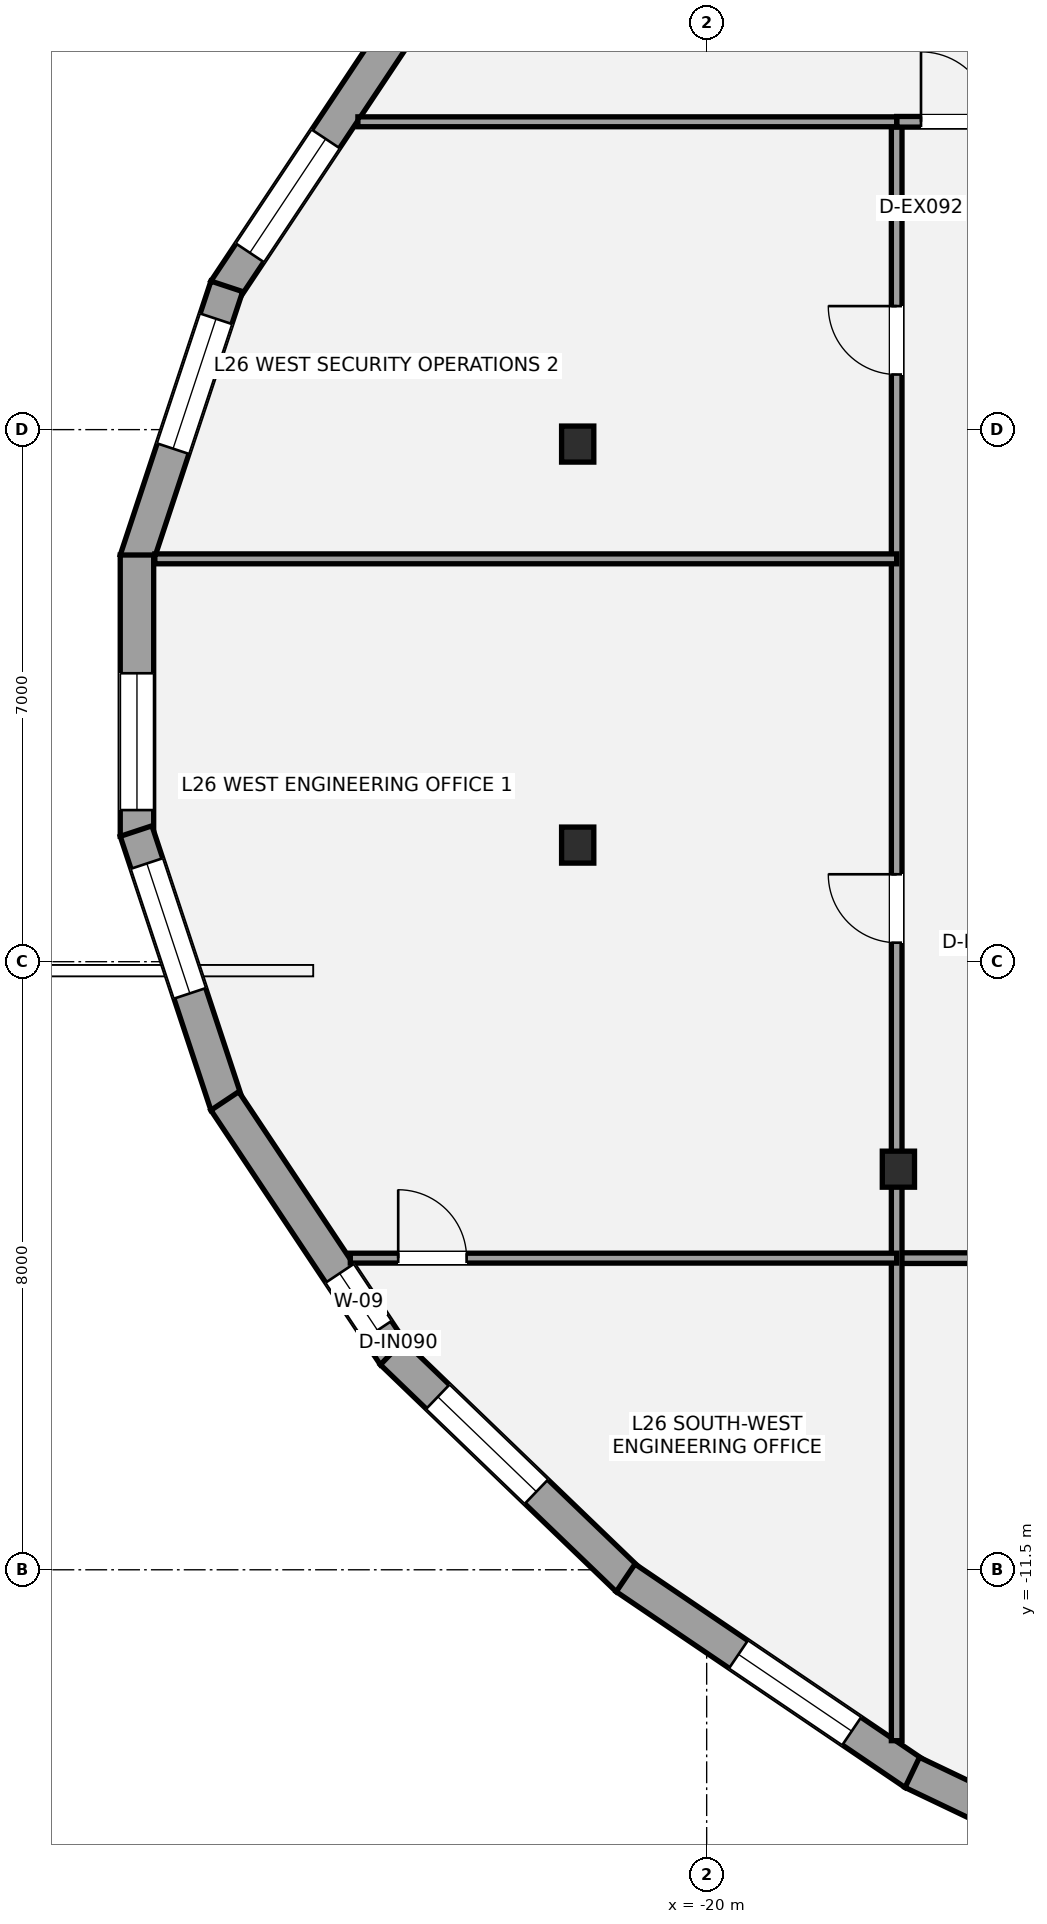
"""IFC4 building model, lengths in metres.
Left out: names, types, materials, properties, quantities, classifications, styles, units other than length and angle.
Written with IfcOpenShell. Run it as: python <this file> out.ifc"""

import sys

from ifc_helpers import new_model, si_unit, direction, frame, frame_2d, origin, origin_2d, place, context, subcontext, project, spatial, rectangle, i_section, extrude, element, fill, save


model = new_model("IFC4")
c1 = context("Model", 3, precision=1e-05, world=origin(), true_north=direction((0.0, 1.0)))
c2 = subcontext(c1, "Body", "Model", "MODEL_VIEW")
j1 = project(units=[si_unit("LENGTHUNIT", "METRE"), si_unit("PLANEANGLEUNIT", "RADIAN")], contexts=[c1])
p1 = place(None, origin())
s1 = spatial("IfcSite", under=j1, at=p1, CompositionType="ELEMENT")
p2 = place(p1, origin())
s2 = spatial("IfcBuilding", under=s1, at=p2, CompositionType="ELEMENT")
p3 = place(p2, frame((0.0, 0.0, 100.1)))
s3 = spatial("IfcBuildingStorey", under=s2, at=p3, CompositionType="ELEMENT", Elevation=100.1)
for number, where, z_axis, x_axis in (
    (1, (-21.697, 3.31, 0.0), (0.0, 0.0, 1.0), (1.0, 0.0, 0.0)),
    (2, (-21.697, -1.966, 0.0), (0.0, 0.0, 1.0), (1.0, 0.0, 0.0)),
    (3, (-17.477, -6.229, 0.0), (0.0, 0.0, 1.0), (1.0, 0.0, 0.0)),
):
    element("IfcColumn", number, at=place(p3, frame(where, z_axis=z_axis, x_axis=x_axis)), inside=s3, PredefinedType="COLUMN", context=c2, shape_type="SweptSolid", body=[
        extrude(i_section(OverallWidth=0.424, OverallDepth=0.474, WebThickness=0.048, FlangeThickness=0.077, at=origin_2d()), origin(), (0.0, 0.0, 1.0), 3.5),
    ])
p4 = place(p3, frame((-26.34, 5.332, 0.0), z_axis=(0.0, 0.0, 1.0), x_axis=(0.554293965046, 0.83232097193, 0.0)))
e4 = element("IfcWall", 4, at=p4, inside=s3, PredefinedType="STANDARD", context=c2, shape_type="SweptSolid", body=[
    extrude(rectangle(XDim=4.023, YDim=0.44, at=frame_2d((2.011, 0.0))), origin(), (0.0, 0.0, 1.0), 2.528),
])
p5 = place(p4, frame((0.594, 0.0, 0.65)))
e5 = element("IfcOpeningElement", 5, at=p5, cuts=e4, PredefinedType="OPENING", context=c2, shape_type="SweptSolid", body=[
    extrude(rectangle(XDim=1.8, YDim=1.7, at=frame_2d((0.9, 0.85))), frame((0.0, 0.23, 0.0), z_axis=(0.0, -1.0, 0.0), x_axis=(1.0, 0.0, 0.0)), (0.0, 0.0, 1.0), 0.46),
])
p6 = place(p3, frame((-27.507, 1.781, 0.0), z_axis=(0.0, 0.0, 1.0), x_axis=(0.314316911692, 0.94931811266, 0.0)))
e6 = element("IfcWall", 6, at=p6, inside=s3, PredefinedType="STANDARD", context=c2, shape_type="SweptSolid", body=[
    extrude(rectangle(XDim=3.796, YDim=0.44, at=frame_2d((1.898, 0.0))), origin(), (0.0, 0.0, 1.0), 2.528),
])
p7 = place(p6, frame((1.547, 0.0, 0.65)))
e7 = element("IfcOpeningElement", 7, at=p7, cuts=e6, PredefinedType="OPENING", context=c2, shape_type="SweptSolid", body=[
    extrude(rectangle(XDim=1.8, YDim=1.7, at=frame_2d((0.9, 0.85))), frame((0.0, 0.23, 0.0), z_axis=(0.0, -1.0, 0.0), x_axis=(1.0, 0.0, 0.0)), (0.0, 0.0, 1.0), 0.46),
])
p8 = place(p3, frame((-27.496, -1.851, 0.0), z_axis=(0.0, 0.0, 1.0), x_axis=(0.0, 1.0, 0.0)))
e8 = element("IfcWall", 8, at=p8, inside=s3, PredefinedType="STANDARD", context=c2, shape_type="SweptSolid", body=[
    extrude(rectangle(XDim=3.701, YDim=0.44, at=frame_2d((1.851, 0.0))), origin(), (0.0, 0.0, 1.0), 2.528),
])
p9 = place(p8, frame((0.345, 0.0, 0.65)))
e9 = element("IfcOpeningElement", 9, at=p9, cuts=e8, PredefinedType="OPENING", context=c2, shape_type="SweptSolid", body=[
    extrude(rectangle(XDim=1.8, YDim=1.7, at=frame_2d((0.9, 0.85))), frame((0.0, 0.23, 0.0), z_axis=(0.0, -1.0, 0.0), x_axis=(1.0, 0.0, 0.0)), (0.0, 0.0, 1.0), 0.46),
])
p10 = place(p3, frame((-26.314, -5.385, 0.0), z_axis=(0.0, 0.0, 1.0), x_axis=(-0.314316911692, 0.94931811266, 0.0)))
e10 = element("IfcWall", 10, at=p10, inside=s3, PredefinedType="STANDARD", context=c2, shape_type="SweptSolid", body=[
    extrude(rectangle(XDim=3.796, YDim=0.44, at=frame_2d((1.898, 0.0))), origin(), (0.0, 0.0, 1.0), 2.528),
])
p11 = place(p10, frame((1.547, 0.0, 0.65)))
e11 = element("IfcOpeningElement", 11, at=p11, cuts=e10, PredefinedType="OPENING", context=c2, shape_type="SweptSolid", body=[
    extrude(rectangle(XDim=1.8, YDim=1.7, at=frame_2d((0.9, 0.85))), frame((0.0, 0.23, 0.0), z_axis=(0.0, -1.0, 0.0), x_axis=(1.0, 0.0, 0.0)), (0.0, 0.0, 1.0), 0.46),
])
p12 = place(p3, frame((-24.11, -8.68, 0.0), z_axis=(0.0, 0.0, 1.0), x_axis=(-0.554293965046, 0.83232097193, 0.0)))
e12 = element("IfcWall", 12, at=p12, inside=s3, PredefinedType="STANDARD", context=c2, shape_type="SweptSolid", body=[
    extrude(rectangle(XDim=4.023, YDim=0.44, at=frame_2d((2.011, 0.0))), origin(), (0.0, 0.0, 1.0), 2.528),
])
p13 = place(p12, frame((0.398, 0.0, 0.58)))
e13 = element("IfcOpeningElement", 13, at=p13, cuts=e12, PredefinedType="OPENING", context=c2, shape_type="SweptSolid", body=[
    extrude(rectangle(XDim=0.9, YDim=1.35, at=frame_2d((0.45, 0.675))), frame((0.0, 0.23, 0.0), z_axis=(0.0, -1.0, 0.0), x_axis=(1.0, 0.0, 0.0)), (0.0, 0.0, 1.0), 0.46),
])
p14 = place(p3, frame((-21.037, -11.63, 0.0), z_axis=(0.0, 0.0, 1.0), x_axis=(-0.720581378362, 0.693370375166, 0.0)))
e14 = element("IfcWall", 14, at=p14, inside=s3, PredefinedType="STANDARD", context=c2, shape_type="SweptSolid", body=[
    extrude(rectangle(XDim=4.307, YDim=0.44, at=frame_2d((2.153, 0.0))), origin(), (0.0, 0.0, 1.0), 2.528),
])
p15 = place(p14, frame((1.67, 0.0, 0.65)))
e15 = element("IfcOpeningElement", 15, at=p15, cuts=e14, PredefinedType="OPENING", context=c2, shape_type="SweptSolid", body=[
    extrude(rectangle(XDim=1.8, YDim=1.7, at=frame_2d((0.9, 0.85))), frame((0.0, 0.23, 0.0), z_axis=(0.0, -1.0, 0.0), x_axis=(1.0, 0.0, 0.0)), (0.0, 0.0, 1.0), 0.46),
])
p16 = place(p3, frame((-17.266, -14.182, 0.0), z_axis=(0.0, 0.0, 1.0), x_axis=(-0.827754551165, 0.56109036975, 0.0)))
e16 = element("IfcWall", 16, at=p16, inside=s3, PredefinedType="STANDARD", context=c2, shape_type="SweptSolid", body=[
    extrude(rectangle(XDim=4.591, YDim=0.44, at=frame_2d((2.295, 0.0))), origin(), (0.0, 0.0, 1.0), 2.528),
])
p17 = place(p16, frame((0.997, 0.0, 0.65)))
e17 = element("IfcOpeningElement", 17, at=p17, cuts=e16, PredefinedType="OPENING", context=c2, shape_type="SweptSolid", body=[
    extrude(rectangle(XDim=1.8, YDim=1.7, at=frame_2d((0.9, 0.85))), frame((0.0, 0.23, 0.0), z_axis=(0.0, -1.0, 0.0), x_axis=(1.0, 0.0, 0.0)), (0.0, 0.0, 1.0), 0.46),
])
p18 = place(p3, frame((-12.89, -16.27, 0.0), z_axis=(0.0, 0.0, 1.0), x_axis=(-0.902372757907, 0.430956385018, 0.0)))
e18 = element("IfcWall", 18, at=p18, inside=s3, PredefinedType="STANDARD", context=c2, shape_type="SweptSolid", body=[
    extrude(rectangle(XDim=4.882, YDim=0.44, at=frame_2d((2.441, 0.0))), origin(), (0.0, 0.0, 1.0), 2.528),
])
p19 = place(p18, frame((1.839, 0.0, 0.65)))
e19 = element("IfcOpeningElement", 19, at=p19, cuts=e18, PredefinedType="OPENING", context=c2, shape_type="SweptSolid", body=[
    extrude(rectangle(XDim=1.8, YDim=1.7, at=frame_2d((0.9, 0.85))), frame((0.0, 0.23, 0.0), z_axis=(0.0, -1.0, 0.0), x_axis=(1.0, 0.0, 0.0)), (0.0, 0.0, 1.0), 0.46),
])
p20 = place(p3, frame((-17.5, -7.4, 0.0), z_axis=(0.0, 0.0, 1.0), x_axis=(1.0, 0.0, 0.0)))
e20 = element("IfcWall", 20, at=p20, inside=s3, PredefinedType="PARTITIONING", context=c2, shape_type="SweptSolid", body=[
    extrude(rectangle(XDim=33.2, YDim=0.14, at=frame_2d((16.6, 0.0))), origin(), (0.0, 0.0, 1.0), 2.688),
])
p21 = place(p20, frame((6.3, 0.0, 0.0)))
e21 = element("IfcOpeningElement", 21, at=p21, cuts=e20, PredefinedType="OPENING", context=c2, shape_type="SweptSolid", body=[
    extrude(rectangle(XDim=0.9, YDim=2.1, at=frame_2d((0.45, 1.05))), frame((0.0, 0.08, 0.0), z_axis=(0.0, -1.0, 0.0), x_axis=(1.0, 0.0, 0.0)), (0.0, 0.0, 1.0), 0.16),
])
p22 = place(p20, frame((18.05, 0.0, 0.0)))
e22 = element("IfcOpeningElement", 22, at=p22, cuts=e20, PredefinedType="OPENING", context=c2, shape_type="SweptSolid", body=[
    extrude(rectangle(XDim=0.9, YDim=2.1, at=frame_2d((0.45, 1.05))), frame((0.0, 0.08, 0.0), z_axis=(0.0, -1.0, 0.0), x_axis=(1.0, 0.0, 0.0)), (0.0, 0.0, 1.0), 0.16),
])
p23 = place(p20, frame((27.9, 0.0, 0.0)))
e23 = element("IfcOpeningElement", 23, at=p23, cuts=e20, PredefinedType="OPENING", context=c2, shape_type="SweptSolid", body=[
    extrude(rectangle(XDim=0.9, YDim=2.1, at=frame_2d((0.45, 1.05))), frame((0.0, 0.08, 0.0), z_axis=(0.0, -1.0, 0.0), x_axis=(1.0, 0.0, 0.0)), (0.0, 0.0, 1.0), 0.16),
])
p24 = place(p3, frame((-17.5, -13.748, 0.0), z_axis=(0.0, 0.0, 1.0), x_axis=(0.0, 1.0, 0.0)))
e24 = element("IfcWall", 24, at=p24, inside=s3, PredefinedType="PARTITIONING", context=c2, shape_type="SweptSolid", body=[
    extrude(rectangle(XDim=21.298, YDim=0.14, at=frame_2d((10.649, 0.0))), origin(), (0.0, 0.0, 1.0), 2.688),
])
p25 = place(p24, frame((10.499, 0.0, 0.0)))
e25 = element("IfcOpeningElement", 25, at=p25, cuts=e24, PredefinedType="OPENING", context=c2, shape_type="SweptSolid", body=[
    extrude(rectangle(XDim=0.9, YDim=2.1, at=frame_2d((0.45, 1.05))), frame((0.0, 0.08, 0.0), z_axis=(0.0, -1.0, 0.0), x_axis=(1.0, 0.0, 0.0)), (0.0, 0.0, 1.0), 0.16),
])
p26 = place(p24, frame((17.974, 0.0, 0.0)))
e26 = element("IfcOpeningElement", 26, at=p26, cuts=e24, PredefinedType="OPENING", context=c2, shape_type="SweptSolid", body=[
    extrude(rectangle(XDim=0.9, YDim=2.1, at=frame_2d((0.45, 1.05))), frame((0.0, 0.08, 0.0), z_axis=(0.0, -1.0, 0.0), x_axis=(1.0, 0.0, 0.0)), (0.0, 0.0, 1.0), 0.16),
])
p27 = place(p3, frame((-17.5, 7.55, 0.0), z_axis=(0.0, 0.0, 1.0), x_axis=(1.0, 0.0, 0.0)))
e27 = element("IfcWall", 27, at=p27, inside=s3, PredefinedType="PARTITIONING", context=c2, shape_type="SweptSolid", body=[
    extrude(rectangle(XDim=3.6, YDim=0.14, at=frame_2d((1.8, 0.0))), origin(), (0.0, 0.0, 1.0), 3.31),
])
p28 = place(p27, frame((0.32, 0.0, 0.0)))
e28 = element("IfcOpeningElement", 28, at=p28, cuts=e27, PredefinedType="OPENING", context=c2, shape_type="SweptSolid", body=[
    extrude(rectangle(XDim=0.92, YDim=2.15, at=frame_2d((0.46, 1.075))), frame((0.0, 0.08, 0.0), z_axis=(0.0, -1.0, 0.0), x_axis=(1.0, 0.0, 0.0)), (0.0, 0.0, 1.0), 0.16),
])
p29 = place(p3, frame((-24.589, 7.55, 0.0), z_axis=(0.0, 0.0, 1.0), x_axis=(1.0, 0.0, 0.0)))
e29 = element("IfcWall", 29, at=p29, inside=s3, PredefinedType="PARTITIONING", context=c2, shape_type="SweptSolid", body=[
    extrude(rectangle(XDim=7.089, YDim=0.13, at=frame_2d((3.544, 0.0))), origin(), (0.0, 0.0, 1.0), 2.763),
])
p30 = place(p3, frame((-24.689, -7.4, 0.0), z_axis=(0.0, 0.0, 1.0), x_axis=(1.0, 0.0, 0.0)))
e30 = element("IfcWall", 30, at=p30, inside=s3, PredefinedType="PARTITIONING", context=c2, shape_type="SweptSolid", body=[
    extrude(rectangle(XDim=7.189, YDim=0.13, at=frame_2d((3.594, 0.0))), origin(), (0.0, 0.0, 1.0), 2.763),
])
p31 = place(p30, frame((0.63, 0.0, 0.0)))
e31 = element("IfcOpeningElement", 31, at=p31, cuts=e30, PredefinedType="OPENING", context=c2, shape_type="SweptSolid", body=[
    extrude(rectangle(XDim=0.9, YDim=2.1, at=frame_2d((0.45, 1.05))), frame((0.0, 0.075, 0.0), z_axis=(0.0, -1.0, 0.0), x_axis=(1.0, 0.0, 0.0)), (0.0, 0.0, 1.0), 0.15),
])
p32 = place(p3, frame((-27.26, 1.8, 0.0), z_axis=(0.0, 0.0, 1.0), x_axis=(1.0, 0.0, 0.0)))
e32 = element("IfcWall", 32, at=p32, inside=s3, PredefinedType="PARTITIONING", context=c2, shape_type="SweptSolid", body=[
    extrude(rectangle(XDim=9.76, YDim=0.13, at=frame_2d((4.88, 0.0))), origin(), (0.0, 0.0, 1.0), 2.763),
])
p33 = place(p5, origin())
e33 = element("IfcWindow", 33, at=p33, inside=s3, PartitioningType="SINGLE_PANEL", PredefinedType="WINDOW", context=c2, shape_type="SweptSolid", body=[
    extrude(rectangle(XDim=1.8, YDim=1.7, at=frame_2d((0.9, 0.85))), frame((0.0, -0.01, 0.0), z_axis=(0.0, -1.0, 0.0), x_axis=(1.0, 0.0, 0.0)), (0.0, 0.0, 1.0), 0.06),
])
fill(e5, e33)
p34 = place(p7, origin())
e34 = element("IfcWindow", 34, at=p34, inside=s3, PartitioningType="SINGLE_PANEL", PredefinedType="WINDOW", context=c2, shape_type="SweptSolid", body=[
    extrude(rectangle(XDim=1.8, YDim=1.7, at=frame_2d((0.9, 0.85))), frame((0.0, -0.01, 0.0), z_axis=(0.0, -1.0, 0.0), x_axis=(1.0, 0.0, 0.0)), (0.0, 0.0, 1.0), 0.06),
])
fill(e7, e34)
p35 = place(p9, origin())
e35 = element("IfcWindow", 35, at=p35, inside=s3, PartitioningType="SINGLE_PANEL", PredefinedType="WINDOW", context=c2, shape_type="SweptSolid", body=[
    extrude(rectangle(XDim=1.8, YDim=1.7, at=frame_2d((0.9, 0.85))), frame((0.0, -0.01, 0.0), z_axis=(0.0, -1.0, 0.0), x_axis=(1.0, 0.0, 0.0)), (0.0, 0.0, 1.0), 0.06),
])
fill(e9, e35)
p36 = place(p11, origin())
e36 = element("IfcWindow", 36, at=p36, inside=s3, PartitioningType="SINGLE_PANEL", PredefinedType="WINDOW", context=c2, shape_type="SweptSolid", body=[
    extrude(rectangle(XDim=1.8, YDim=1.7, at=frame_2d((0.9, 0.85))), frame((0.0, -0.01, 0.0), z_axis=(0.0, -1.0, 0.0), x_axis=(1.0, 0.0, 0.0)), (0.0, 0.0, 1.0), 0.06),
])
fill(e11, e36)
p37 = place(p13, origin())
e37 = element("IfcWindow", 37, at=p37, inside=s3, PartitioningType="SINGLE_PANEL", PredefinedType="WINDOW", context=c2, shape_type="SweptSolid", body=[
    extrude(rectangle(XDim=0.9, YDim=1.35, at=frame_2d((0.45, 0.675))), frame((0.0, -0.01, 0.0), z_axis=(0.0, -1.0, 0.0), x_axis=(1.0, 0.0, 0.0)), (0.0, 0.0, 1.0), 0.06),
])
fill(e13, e37)
p38 = place(p15, origin())
e38 = element("IfcWindow", 38, at=p38, inside=s3, PartitioningType="SINGLE_PANEL", PredefinedType="WINDOW", context=c2, shape_type="SweptSolid", body=[
    extrude(rectangle(XDim=1.8, YDim=1.7, at=frame_2d((0.9, 0.85))), frame((0.0, -0.01, 0.0), z_axis=(0.0, -1.0, 0.0), x_axis=(1.0, 0.0, 0.0)), (0.0, 0.0, 1.0), 0.06),
])
fill(e15, e38)
p39 = place(p17, origin())
e39 = element("IfcWindow", 39, at=p39, inside=s3, PartitioningType="SINGLE_PANEL", PredefinedType="WINDOW", context=c2, shape_type="SweptSolid", body=[
    extrude(rectangle(XDim=1.8, YDim=1.7, at=frame_2d((0.9, 0.85))), frame((0.0, -0.01, 0.0), z_axis=(0.0, -1.0, 0.0), x_axis=(1.0, 0.0, 0.0)), (0.0, 0.0, 1.0), 0.06),
])
fill(e17, e39)
p40 = place(p28, origin())
e40 = element("IfcDoor", 40, at=p40, inside=s3, OperationType="SINGLE_SWING_LEFT", PredefinedType="DOOR", context=c2, shape_type="SweptSolid", body=[
    extrude(rectangle(XDim=0.92, YDim=2.15, at=frame_2d((0.46, 1.075))), frame((0.0, 0.025, 0.0), z_axis=(0.0, -1.0, 0.0), x_axis=(1.0, 0.0, 0.0)), (0.0, 0.0, 1.0), 0.05),
])
fill(e28, e40)
p41 = place(p31, origin())
e41 = element("IfcDoor", 41, at=p41, inside=s3, OperationType="SINGLE_SWING_LEFT", PredefinedType="DOOR", context=c2, shape_type="SweptSolid", body=[
    extrude(rectangle(XDim=0.9, YDim=2.1, at=frame_2d((0.45, 1.05))), frame((0.0, 0.025, 0.0), z_axis=(0.0, -1.0, 0.0), x_axis=(1.0, 0.0, 0.0)), (0.0, 0.0, 1.0), 0.05),
])
fill(e31, e41)
p42 = place(p25, origin())
e42 = element("IfcDoor", 42, at=p42, inside=s3, OperationType="SINGLE_SWING_RIGHT", PredefinedType="DOOR", context=c2, shape_type="SweptSolid", body=[
    extrude(rectangle(XDim=0.9, YDim=2.1, at=frame_2d((0.45, 1.05))), frame((0.0, 0.025, 0.0), z_axis=(0.0, -1.0, 0.0), x_axis=(1.0, 0.0, 0.0)), (0.0, 0.0, 1.0), 0.05),
])
fill(e25, e42)
p43 = place(p26, origin())
e43 = element("IfcDoor", 43, at=p43, inside=s3, OperationType="SINGLE_SWING_RIGHT", PredefinedType="DOOR", context=c2, shape_type="SweptSolid", body=[
    extrude(rectangle(XDim=0.9, YDim=2.1, at=frame_2d((0.45, 1.05))), frame((0.0, 0.025, 0.0), z_axis=(0.0, -1.0, 0.0), x_axis=(1.0, 0.0, 0.0)), (0.0, 0.0, 1.0), 0.05),
])
fill(e26, e43)
save(model, sys.argv[1])
